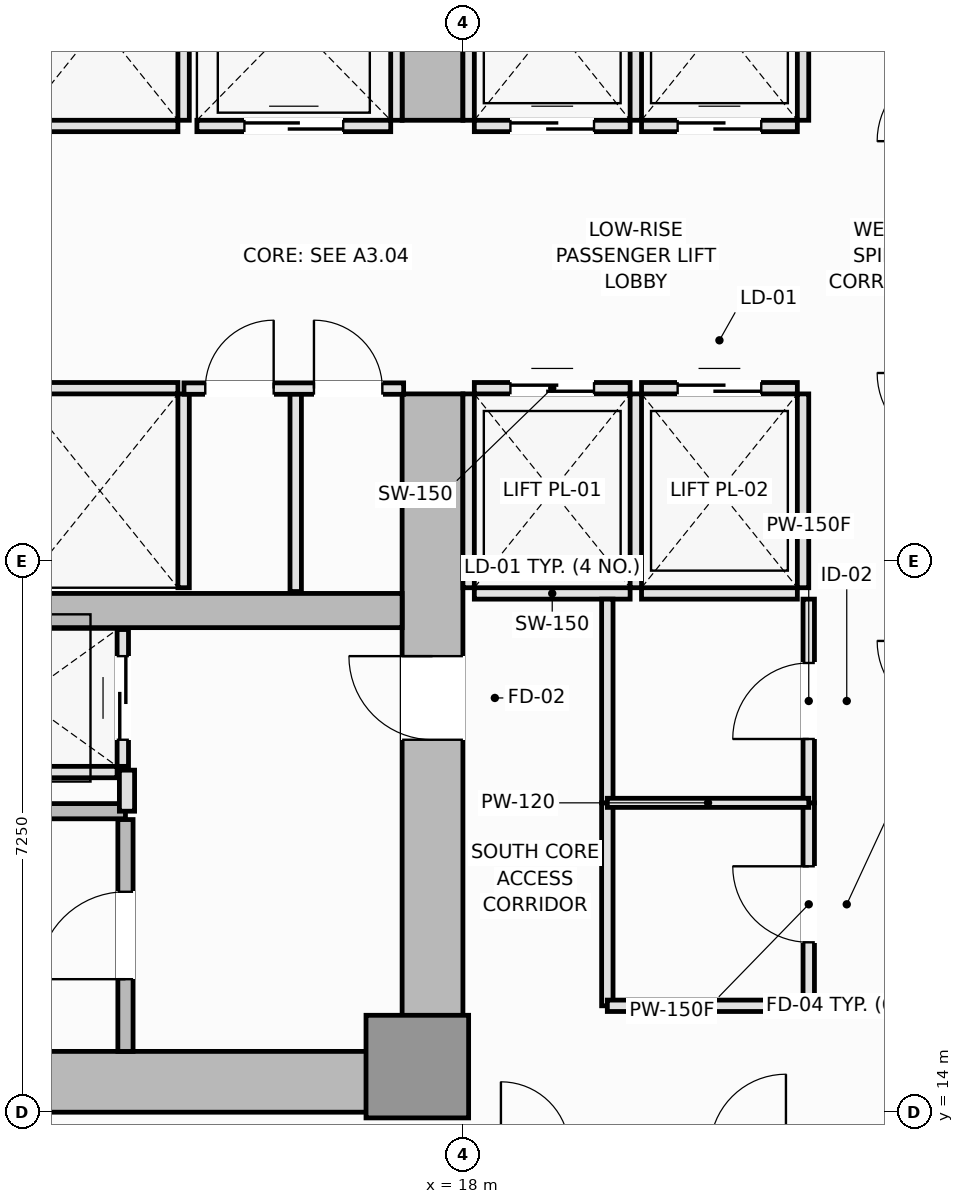
"""IFC4 building model, lengths in metres.
Left out: names, types, materials, properties, quantities, classifications, styles, units other than length and angle.
Written with IfcOpenShell. Run it as: python <this file> out.ifc"""

import sys

from ifc_helpers import new_model, si_unit, direction, frame, frame_2d, origin, origin_2d, place, context, subcontext, project, spatial, rectangle, extrude, element, fill, save


model = new_model("IFC4")
c1 = context("Model", 3, precision=1e-05, world=origin(), true_north=direction((0.0, 1.0)))
c2 = subcontext(c1, "Body", "Model", "MODEL_VIEW")
j1 = project(units=[si_unit("LENGTHUNIT", "METRE"), si_unit("PLANEANGLEUNIT", "RADIAN")], contexts=[c1])
p1 = place(None, origin())
s1 = spatial("IfcSite", under=j1, at=p1, CompositionType="ELEMENT")
p2 = place(p1, origin())
s2 = spatial("IfcBuilding", under=s1, at=p2, CompositionType="ELEMENT")
p3 = place(p2, frame((0.0, 0.0, 89.5)))
s3 = spatial("IfcBuildingStorey", under=s2, at=p3, CompositionType="ELEMENT", Elevation=89.5)
p4 = place(p3, frame((4.5, 14.4, 0.0), z_axis=(0.0, 0.0, 1.0), x_axis=(1.0, 0.0, 0.0)))
e1 = element("IfcWall", 1, at=p4, inside=s3, PredefinedType="SHEAR", context=c2, shape_type="SweptSolid", body=[
    extrude(rectangle(XDim=13.5, YDim=0.8, at=frame_2d((6.75, 0.0))), origin(), (0.0, 0.0, 1.0), 3.55),
])
p5 = place(p3, frame((17.6, 14.8, 0.0), z_axis=(0.0, 0.0, 1.0), x_axis=(0.0, 1.0, 0.0)))
e2 = element("IfcWall", 2, at=p5, inside=s3, PredefinedType="SHEAR", context=c2, shape_type="SweptSolid", body=[
    extrude(rectangle(XDim=8.65, YDim=0.8, at=frame_2d((4.325, 0.0))), origin(), (0.0, 0.0, 1.0), 3.55),
])
p6 = place(p5, frame((4.1, 0.0, 0.0)))
e3 = element("IfcOpeningElement", 3, at=p6, cuts=e2, PredefinedType="OPENING", context=c2, shape_type="SweptSolid", body=[
    extrude(rectangle(XDim=1.1, YDim=2.15, at=frame_2d((0.55, 1.075))), frame((0.0, 0.41, 0.0), z_axis=(0.0, -1.0, 0.0), x_axis=(1.0, 0.0, 0.0)), (0.0, 0.0, 1.0), 0.82),
])
p7 = place(p3, frame((17.6, 27.05, 0.0), z_axis=(0.0, 0.0, 1.0), x_axis=(0.0, 1.0, 0.0)))
e4 = element("IfcWall", 4, at=p7, inside=s3, PredefinedType="SHEAR", context=c2, shape_type="SweptSolid", body=[
    extrude(rectangle(XDim=8.65, YDim=0.8, at=frame_2d((4.325, 0.0))), origin(), (0.0, 0.0, 1.0), 3.55),
])
p8 = place(p7, frame((3.45, 0.0, 0.0)))
e5 = element("IfcOpeningElement", 5, at=p8, cuts=e4, PredefinedType="OPENING", context=c2, shape_type="SweptSolid", body=[
    extrude(rectangle(XDim=1.1, YDim=2.15, at=frame_2d((0.55, 1.075))), frame((0.0, 0.41, 0.0), z_axis=(0.0, -1.0, 0.0), x_axis=(1.0, 0.0, 0.0)), (0.0, 0.0, 1.0), 0.82),
])
p9 = place(p3, frame((5.3, 20.6, 0.0), z_axis=(0.0, 0.0, 1.0), x_axis=(1.0, 0.0, 0.0)))
e6 = element("IfcWall", 6, at=p9, inside=s3, PredefinedType="SHEAR", context=c2, shape_type="SweptSolid", body=[
    extrude(rectangle(XDim=11.9, YDim=0.45, at=frame_2d((5.95, 0.0))), origin(), (0.0, 0.0, 1.0), 3.55),
])
p10 = place(p3, frame((17.4, 14.6, 0.0), z_axis=(0.0, 0.0, 1.0), x_axis=(1.0, 0.0, 0.0)))
e7 = element("IfcColumn", 7, at=p10, inside=s3, PredefinedType="PILASTER", context=c2, shape_type="SweptSolid", body=[
    extrude(rectangle(XDim=1.35, YDim=1.35, at=origin_2d()), origin(), (0.0, 0.0, 1.0), 3.55),
])
p11 = place(p3, frame((5.9, 17.96, 0.0), z_axis=(0.0, 0.0, 1.0), x_axis=(1.0, 0.0, 0.0)))
e8 = element("IfcWall", 8, at=p11, inside=s3, PredefinedType="SOLIDWALL", context=c2, shape_type="SweptSolid", body=[
    extrude(rectangle(XDim=7.66, YDim=0.2, at=frame_2d((3.83, 0.0))), origin(), (0.0, 0.0, 1.0), 3.55),
])
p12 = place(p3, frame((13.56, 14.8, 0.0), z_axis=(0.0, 0.0, 1.0), x_axis=(0.0, 1.0, 0.0)))
e9 = element("IfcWall", 9, at=p12, inside=s3, PredefinedType="SOLIDWALL", context=c2, shape_type="SweptSolid", body=[
    extrude(rectangle(XDim=3.05, YDim=0.2, at=frame_2d((1.525, 0.0))), origin(), (0.0, 0.0, 1.0), 3.55),
])
p13 = place(p12, frame((0.95, 0.0, 0.0)))
e10 = element("IfcOpeningElement", 10, at=p13, cuts=e9, PredefinedType="OPENING", context=c2, shape_type="SweptSolid", body=[
    extrude(rectangle(XDim=1.15, YDim=2.15, at=frame_2d((0.575, 1.075))), frame((0.0, 0.11, 0.0), z_axis=(0.0, -1.0, 0.0), x_axis=(1.0, 0.0, 0.0)), (0.0, 0.0, 1.0), 0.22),
])
p14 = place(p3, frame((18.15, 20.825, 0.0), z_axis=(0.0, 0.0, 1.0), x_axis=(1.0, 0.0, 0.0)))
e11 = element("IfcWall", 11, at=p14, inside=s3, PredefinedType="PARTITIONING", context=c2, shape_type="SweptSolid", body=[
    extrude(rectangle(XDim=2.05, YDim=0.15, at=frame_2d((1.025, 0.0))), origin(), (0.0, 0.0, 1.0), 3.35),
])
p15 = place(p3, frame((18.15, 23.525, 0.0), z_axis=(0.0, 0.0, 1.0), x_axis=(1.0, 0.0, 0.0)))
e12 = element("IfcWall", 12, at=p15, inside=s3, PredefinedType="PARTITIONING", context=c2, shape_type="SweptSolid", body=[
    extrude(rectangle(XDim=2.05, YDim=0.15, at=frame_2d((1.025, 0.0))), origin(), (0.0, 0.0, 1.0), 3.35),
])
p16 = place(p15, frame((0.475, 0.0, 0.0)))
e13 = element("IfcOpeningElement", 13, at=p16, cuts=e12, PredefinedType="OPENING", context=c2, shape_type="SweptSolid", body=[
    extrude(rectangle(XDim=1.1, YDim=2.2, at=frame_2d((0.55, 1.1))), frame((0.0, 0.085, 0.0), z_axis=(0.0, -1.0, 0.0), x_axis=(1.0, 0.0, 0.0)), (0.0, 0.0, 1.0), 0.17),
])
for number, where, z_axis, x_axis in (
    (14, (18.075, 20.9, 0.0), (0.0, 0.0, 1.0), (0.0, 1.0, 0.0)),
    (15, (20.275, 20.9, 0.0), (0.0, 0.0, 1.0), (0.0, 1.0, 0.0)),
):
    element("IfcWall", number, at=place(p3, frame(where, z_axis=z_axis, x_axis=x_axis)), inside=s3, PredefinedType="PARTITIONING", context=c2, shape_type="SweptSolid", body=[
        extrude(rectangle(XDim=2.55, YDim=0.15, at=frame_2d((1.275, 0.0))), origin(), (0.0, 0.0, 1.0), 3.35),
    ])
p17 = place(p3, frame((20.35, 20.825, 0.0), z_axis=(0.0, 0.0, 1.0), x_axis=(1.0, 0.0, 0.0)))
e16 = element("IfcWall", 16, at=p17, inside=s3, PredefinedType="PARTITIONING", context=c2, shape_type="SweptSolid", body=[
    extrude(rectangle(XDim=2.05, YDim=0.15, at=frame_2d((1.025, 0.0))), origin(), (0.0, 0.0, 1.0), 3.35),
])
p18 = place(p3, frame((20.35, 23.525, 0.0), z_axis=(0.0, 0.0, 1.0), x_axis=(1.0, 0.0, 0.0)))
e17 = element("IfcWall", 17, at=p18, inside=s3, PredefinedType="PARTITIONING", context=c2, shape_type="SweptSolid", body=[
    extrude(rectangle(XDim=2.05, YDim=0.15, at=frame_2d((1.025, 0.0))), origin(), (0.0, 0.0, 1.0), 3.35),
])
p19 = place(p18, frame((0.475, 0.0, 0.0)))
e18 = element("IfcOpeningElement", 18, at=p19, cuts=e17, PredefinedType="OPENING", context=c2, shape_type="SweptSolid", body=[
    extrude(rectangle(XDim=1.1, YDim=2.2, at=frame_2d((0.55, 1.1))), frame((0.0, 0.085, 0.0), z_axis=(0.0, -1.0, 0.0), x_axis=(1.0, 0.0, 0.0)), (0.0, 0.0, 1.0), 0.17),
])
p20 = place(p3, frame((22.475, 20.9, 0.0), z_axis=(0.0, 0.0, 1.0), x_axis=(0.0, 1.0, 0.0)))
e19 = element("IfcWall", 19, at=p20, inside=s3, PredefinedType="PARTITIONING", context=c2, shape_type="SweptSolid", body=[
    extrude(rectangle(XDim=2.55, YDim=0.15, at=frame_2d((1.275, 0.0))), origin(), (0.0, 0.0, 1.0), 3.35),
])
p21 = place(p3, frame((18.15, 26.975, 0.0), z_axis=(0.0, 0.0, 1.0), x_axis=(1.0, 0.0, 0.0)))
e20 = element("IfcWall", 20, at=p21, inside=s3, PredefinedType="PARTITIONING", context=c2, shape_type="SweptSolid", body=[
    extrude(rectangle(XDim=2.05, YDim=0.15, at=frame_2d((1.025, 0.0))), origin(), (0.0, 0.0, 1.0), 3.35),
])
p22 = place(p21, frame((0.475, 0.0, 0.0)))
e21 = element("IfcOpeningElement", 21, at=p22, cuts=e20, PredefinedType="OPENING", context=c2, shape_type="SweptSolid", body=[
    extrude(rectangle(XDim=1.1, YDim=2.2, at=frame_2d((0.55, 1.1))), frame((0.0, 0.085, 0.0), z_axis=(0.0, -1.0, 0.0), x_axis=(1.0, 0.0, 0.0)), (0.0, 0.0, 1.0), 0.17),
])
for number, where, z_axis, x_axis in (
    (22, (18.075, 27.05, 0.0), (0.0, 0.0, 1.0), (0.0, 1.0, 0.0)),
    (23, (20.275, 27.05, 0.0), (0.0, 0.0, 1.0), (0.0, 1.0, 0.0)),
):
    element("IfcWall", number, at=place(p3, frame(where, z_axis=z_axis, x_axis=x_axis)), inside=s3, PredefinedType="PARTITIONING", context=c2, shape_type="SweptSolid", body=[
        extrude(rectangle(XDim=2.55, YDim=0.15, at=frame_2d((1.275, 0.0))), origin(), (0.0, 0.0, 1.0), 3.35),
    ])
p23 = place(p3, frame((20.35, 26.975, 0.0), z_axis=(0.0, 0.0, 1.0), x_axis=(1.0, 0.0, 0.0)))
e24 = element("IfcWall", 24, at=p23, inside=s3, PredefinedType="PARTITIONING", context=c2, shape_type="SweptSolid", body=[
    extrude(rectangle(XDim=2.05, YDim=0.15, at=frame_2d((1.025, 0.0))), origin(), (0.0, 0.0, 1.0), 3.35),
])
p24 = place(p23, frame((0.475, 0.0, 0.0)))
e25 = element("IfcOpeningElement", 25, at=p24, cuts=e24, PredefinedType="OPENING", context=c2, shape_type="SweptSolid", body=[
    extrude(rectangle(XDim=1.1, YDim=2.2, at=frame_2d((0.55, 1.1))), frame((0.0, 0.085, 0.0), z_axis=(0.0, -1.0, 0.0), x_axis=(1.0, 0.0, 0.0)), (0.0, 0.0, 1.0), 0.17),
])
p25 = place(p3, frame((22.475, 27.05, 0.0), z_axis=(0.0, 0.0, 1.0), x_axis=(0.0, 1.0, 0.0)))
e26 = element("IfcWall", 26, at=p25, inside=s3, PredefinedType="PARTITIONING", context=c2, shape_type="SweptSolid", body=[
    extrude(rectangle(XDim=2.55, YDim=0.15, at=frame_2d((1.275, 0.0))), origin(), (0.0, 0.0, 1.0), 3.35),
])
p26 = place(p3, frame((12.2, 23.525, 0.0), z_axis=(0.0, 0.0, 1.0), x_axis=(1.0, 0.0, 0.0)))
e27 = element("IfcWall", 27, at=p26, inside=s3, PredefinedType="PARTITIONING", context=c2, shape_type="SweptSolid", body=[
    extrude(rectangle(XDim=2.05, YDim=0.15, at=frame_2d((1.025, 0.0))), origin(), (0.0, 0.0, 1.0), 3.35),
])
p27 = place(p3, frame((14.325, 20.9, 0.0), z_axis=(0.0, 0.0, 1.0), x_axis=(0.0, 1.0, 0.0)))
e28 = element("IfcWall", 28, at=p27, inside=s3, PredefinedType="PARTITIONING", context=c2, shape_type="SweptSolid", body=[
    extrude(rectangle(XDim=2.55, YDim=0.15, at=frame_2d((1.275, 0.0))), origin(), (0.0, 0.0, 1.0), 3.35),
])
p28 = place(p3, frame((12.2, 26.975, 0.0), z_axis=(0.0, 0.0, 1.0), x_axis=(1.0, 0.0, 0.0)))
e29 = element("IfcWall", 29, at=p28, inside=s3, PredefinedType="PARTITIONING", context=c2, shape_type="SweptSolid", body=[
    extrude(rectangle(XDim=2.05, YDim=0.15, at=frame_2d((1.025, 0.0))), origin(), (0.0, 0.0, 1.0), 3.35),
])
p29 = place(p3, frame((14.325, 27.05, 0.0), z_axis=(0.0, 0.0, 1.0), x_axis=(0.0, 1.0, 0.0)))
e30 = element("IfcWall", 30, at=p29, inside=s3, PredefinedType="PARTITIONING", context=c2, shape_type="SweptSolid", body=[
    extrude(rectangle(XDim=2.55, YDim=0.15, at=frame_2d((1.275, 0.0))), origin(), (0.0, 0.0, 1.0), 3.35),
])
p30 = place(p3, frame((14.5, 26.975, 0.0), z_axis=(0.0, 0.0, 1.0), x_axis=(1.0, 0.0, 0.0)))
e31 = element("IfcWall", 31, at=p30, inside=s3, PredefinedType="PARTITIONING", context=c2, shape_type="SweptSolid", body=[
    extrude(rectangle(XDim=2.55, YDim=0.15, at=frame_2d((1.275, 0.0))), origin(), (0.0, 0.0, 1.0), 3.35),
])
p31 = place(p30, frame((0.625, 0.0, 0.0)))
e32 = element("IfcOpeningElement", 32, at=p31, cuts=e31, PredefinedType="OPENING", context=c2, shape_type="SweptSolid", body=[
    extrude(rectangle(XDim=1.3, YDim=2.2, at=frame_2d((0.65, 1.1))), frame((0.0, 0.085, 0.0), z_axis=(0.0, -1.0, 0.0), x_axis=(1.0, 0.0, 0.0)), (0.0, 0.0, 1.0), 0.17),
])
p32 = place(p3, frame((17.125, 27.05, 0.0), z_axis=(0.0, 0.0, 1.0), x_axis=(0.0, 1.0, 0.0)))
e33 = element("IfcWall", 33, at=p32, inside=s3, PredefinedType="PARTITIONING", context=c2, shape_type="SweptSolid", body=[
    extrude(rectangle(XDim=2.6, YDim=0.15, at=frame_2d((1.3, 0.0))), origin(), (0.0, 0.0, 1.0), 3.35),
])
p33 = place(p3, frame((10.95, 18.475, 0.0), z_axis=(0.0, 0.0, 1.0), x_axis=(1.0, 0.0, 0.0)))
e34 = element("IfcWall", 34, at=p33, inside=s3, PredefinedType="PARTITIONING", context=c2, shape_type="SweptSolid", body=[
    extrude(rectangle(XDim=2.5, YDim=0.15, at=frame_2d((1.25, 0.0))), origin(), (0.0, 0.0, 1.0), 3.35),
])
p34 = place(p3, frame((13.525, 18.55, 0.0), z_axis=(0.0, 0.0, 1.0), x_axis=(0.0, 1.0, 0.0)))
e35 = element("IfcWall", 35, at=p34, inside=s3, PredefinedType="PARTITIONING", context=c2, shape_type="SweptSolid", body=[
    extrude(rectangle(XDim=1.8, YDim=0.15, at=frame_2d((0.9, 0.0))), origin(), (0.0, 0.0, 1.0), 3.35),
])
p35 = place(p34, frame((0.35, 0.0, 0.0)))
e36 = element("IfcOpeningElement", 36, at=p35, cuts=e35, PredefinedType="OPENING", context=c2, shape_type="SweptSolid", body=[
    extrude(rectangle(XDim=1.1, YDim=2.2, at=frame_2d((0.55, 1.1))), frame((0.0, 0.085, 0.0), z_axis=(0.0, -1.0, 0.0), x_axis=(1.0, 0.0, 0.0)), (0.0, 0.0, 1.0), 0.17),
])
p36 = place(p3, frame((13.58, 17.96, 0.0), z_axis=(0.0, 0.0, 1.0), x_axis=(0.0, 1.0, 0.0)))
e37 = element("IfcWall", 37, at=p36, inside=s3, PredefinedType="PARTITIONING", context=c2, shape_type="SweptSolid", body=[
    extrude(rectangle(XDim=0.54, YDim=0.2, at=frame_2d((0.27, 0.0))), origin(), (0.0, 0.0, 1.0), 3.35),
])
p37 = place(p3, frame((15.8, 20.85, 0.0), z_axis=(0.0, 0.0, 1.0), x_axis=(0.0, 1.0, 0.0)))
e38 = element("IfcWall", 38, at=p37, inside=s3, PredefinedType="PARTITIONING", context=c2, shape_type="SweptSolid", body=[
    extrude(rectangle(XDim=2.67, YDim=0.15, at=frame_2d((1.335, 0.0))), origin(), (0.0, 0.0, 1.0), 3.35),
])
p38 = place(p3, frame((14.33, 23.52, 0.0), z_axis=(0.0, 0.0, 1.0), x_axis=(1.0, 0.0, 0.0)))
e39 = element("IfcWall", 39, at=p38, inside=s3, PredefinedType="PARTITIONING", context=c2, shape_type="SweptSolid", body=[
    extrude(rectangle(XDim=2.89, YDim=0.15, at=frame_2d((1.445, 0.0))), origin(), (0.0, 0.0, 1.0), 3.35),
])
p39 = place(p38, frame((0.28, 0.0, 0.0)))
e40 = element("IfcOpeningElement", 40, at=p39, cuts=e39, PredefinedType="OPENING", context=c2, shape_type="SweptSolid", body=[
    extrude(rectangle(XDim=0.9, YDim=2.1, at=frame_2d((0.45, 1.05))), frame((0.0, 0.085, 0.0), z_axis=(0.0, -1.0, 0.0), x_axis=(1.0, 0.0, 0.0)), (0.0, 0.0, 1.0), 0.17),
])
p40 = place(p38, frame((1.71, 0.0, 0.0)))
e41 = element("IfcOpeningElement", 41, at=p40, cuts=e39, PredefinedType="OPENING", context=c2, shape_type="SweptSolid", body=[
    extrude(rectangle(XDim=0.9, YDim=2.1, at=frame_2d((0.45, 1.05))), frame((0.0, 0.085, 0.0), z_axis=(0.0, -1.0, 0.0), x_axis=(1.0, 0.0, 0.0)), (0.0, 0.0, 1.0), 0.17),
])
p41 = place(p3, frame((22.55, 15.4, 0.0), z_axis=(0.0, 0.0, 1.0), x_axis=(0.0, 1.0, 0.0)))
e42 = element("IfcWall", 42, at=p41, inside=s3, PredefinedType="PARTITIONING", context=c2, shape_type="SweptSolid", body=[
    extrude(rectangle(XDim=2.67, YDim=0.15, at=frame_2d((1.335, 0.0))), origin(), (0.0, 0.0, 1.0), 2.99),
])
p42 = place(p41, frame((0.835, 0.0, 0.0)))
e43 = element("IfcOpeningElement", 43, at=p42, cuts=e42, PredefinedType="OPENING", context=c2, shape_type="SweptSolid", body=[
    extrude(rectangle(XDim=1.0, YDim=2.15, at=frame_2d((0.5, 1.075))), frame((0.0, 0.085, 0.0), z_axis=(0.0, -1.0, 0.0), x_axis=(1.0, 0.0, 0.0)), (0.0, 0.0, 1.0), 0.17),
])
p43 = place(p3, frame((22.55, 18.07, 0.0), z_axis=(0.0, 0.0, 1.0), x_axis=(0.0, 1.0, 0.0)))
e44 = element("IfcWall", 44, at=p43, inside=s3, PredefinedType="PARTITIONING", context=c2, shape_type="SweptSolid", body=[
    extrude(rectangle(XDim=2.68, YDim=0.15, at=frame_2d((1.34, 0.0))), origin(), (0.0, 0.0, 1.0), 2.99),
])
p44 = place(p43, frame((0.84, 0.0, 0.0)))
e45 = element("IfcOpeningElement", 45, at=p44, cuts=e44, PredefinedType="OPENING", context=c2, shape_type="SweptSolid", body=[
    extrude(rectangle(XDim=1.0, YDim=2.15, at=frame_2d((0.5, 1.075))), frame((0.0, 0.085, 0.0), z_axis=(0.0, -1.0, 0.0), x_axis=(1.0, 0.0, 0.0)), (0.0, 0.0, 1.0), 0.17),
])
p45 = place(p3, frame((19.9, 15.4, 0.0), z_axis=(0.0, 0.0, 1.0), x_axis=(0.0, 1.0, 0.0)))
e46 = element("IfcWall", 46, at=p45, inside=s3, PredefinedType="PARTITIONING", context=c2, shape_type="SweptSolid", body=[
    extrude(rectangle(XDim=2.67, YDim=0.15, at=frame_2d((1.335, 0.0))), origin(), (0.0, 0.0, 1.0), 3.35),
])
p46 = place(p3, frame((19.9, 18.07, 0.0), z_axis=(0.0, 0.0, 1.0), x_axis=(0.0, 1.0, 0.0)))
e47 = element("IfcWall", 47, at=p46, inside=s3, PredefinedType="PARTITIONING", context=c2, shape_type="SweptSolid", body=[
    extrude(rectangle(XDim=2.68, YDim=0.15, at=frame_2d((1.34, 0.0))), origin(), (0.0, 0.0, 1.0), 3.35),
])
p47 = place(p3, frame((19.9, 15.4, 0.0), z_axis=(0.0, 0.0, 1.0), x_axis=(1.0, 0.0, 0.0)))
e48 = element("IfcWall", 48, at=p47, inside=s3, PredefinedType="PARTITIONING", context=c2, shape_type="SweptSolid", body=[
    extrude(rectangle(XDim=2.65, YDim=0.15, at=frame_2d((1.325, 0.0))), origin(), (0.0, 0.0, 1.0), 3.35),
])
p48 = place(p3, frame((19.9, 18.07, 0.0), z_axis=(0.0, 0.0, 1.0), x_axis=(1.0, 0.0, 0.0)))
e49 = element("IfcWall", 49, at=p48, inside=s3, PredefinedType="PARTITIONING", context=c2, shape_type="SweptSolid", body=[
    extrude(rectangle(XDim=2.65, YDim=0.12, at=frame_2d((1.325, 0.0))), origin(), (0.0, 0.0, 1.0), 3.35),
])
p49 = place(p13, origin())
e50 = element("IfcDoor", 50, at=p49, inside=s3, OperationType="SINGLE_SWING_LEFT", PredefinedType="DOOR", context=c2, shape_type="SweptSolid", body=[
    extrude(rectangle(XDim=1.15, YDim=2.15, at=frame_2d((0.575, 1.075))), frame((0.0, 0.025, 0.0), z_axis=(0.0, -1.0, 0.0), x_axis=(1.0, 0.0, 0.0)), (0.0, 0.0, 1.0), 0.05),
])
fill(e10, e50)
p50 = place(p16, origin())
e51 = element("IfcDoor", 51, at=p50, inside=s3, OperationType="DOUBLE_DOOR_SLIDING", PredefinedType="DOOR", context=c2, shape_type="SweptSolid", body=[
    extrude(rectangle(XDim=1.1, YDim=2.2, at=frame_2d((0.55, 1.1))), frame((0.0, 0.025, 0.0), z_axis=(0.0, -1.0, 0.0), x_axis=(1.0, 0.0, 0.0)), (0.0, 0.0, 1.0), 0.05),
])
fill(e13, e51)
p51 = place(p19, origin())
e52 = element("IfcDoor", 52, at=p51, inside=s3, OperationType="DOUBLE_DOOR_SLIDING", PredefinedType="DOOR", context=c2, shape_type="SweptSolid", body=[
    extrude(rectangle(XDim=1.1, YDim=2.2, at=frame_2d((0.55, 1.1))), frame((0.0, 0.025, 0.0), z_axis=(0.0, -1.0, 0.0), x_axis=(1.0, 0.0, 0.0)), (0.0, 0.0, 1.0), 0.05),
])
fill(e18, e52)
p52 = place(p22, origin())
e53 = element("IfcDoor", 53, at=p52, inside=s3, OperationType="DOUBLE_DOOR_SLIDING", PredefinedType="DOOR", context=c2, shape_type="SweptSolid", body=[
    extrude(rectangle(XDim=1.1, YDim=2.2, at=frame_2d((0.55, 1.1))), frame((0.0, 0.025, 0.0), z_axis=(0.0, -1.0, 0.0), x_axis=(1.0, 0.0, 0.0)), (0.0, 0.0, 1.0), 0.05),
])
fill(e21, e53)
p53 = place(p24, origin())
e54 = element("IfcDoor", 54, at=p53, inside=s3, OperationType="DOUBLE_DOOR_SLIDING", PredefinedType="DOOR", context=c2, shape_type="SweptSolid", body=[
    extrude(rectangle(XDim=1.1, YDim=2.2, at=frame_2d((0.55, 1.1))), frame((0.0, 0.025, 0.0), z_axis=(0.0, -1.0, 0.0), x_axis=(1.0, 0.0, 0.0)), (0.0, 0.0, 1.0), 0.05),
])
fill(e25, e54)
p54 = place(p31, origin())
e55 = element("IfcDoor", 55, at=p54, inside=s3, OperationType="DOUBLE_DOOR_SLIDING", PredefinedType="DOOR", context=c2, shape_type="SweptSolid", body=[
    extrude(rectangle(XDim=1.3, YDim=2.2, at=frame_2d((0.65, 1.1))), frame((0.0, 0.025, 0.0), z_axis=(0.0, -1.0, 0.0), x_axis=(1.0, 0.0, 0.0)), (0.0, 0.0, 1.0), 0.05),
])
fill(e32, e55)
p55 = place(p35, origin())
e56 = element("IfcDoor", 56, at=p55, inside=s3, OperationType="DOUBLE_DOOR_SLIDING", PredefinedType="DOOR", context=c2, shape_type="SweptSolid", body=[
    extrude(rectangle(XDim=1.1, YDim=2.2, at=frame_2d((0.55, 1.1))), frame((0.0, 0.025, 0.0), z_axis=(0.0, -1.0, 0.0), x_axis=(1.0, 0.0, 0.0)), (0.0, 0.0, 1.0), 0.05),
])
fill(e36, e56)
p56 = place(p6, origin())
e57 = element("IfcDoor", 57, at=p56, inside=s3, OperationType="SINGLE_SWING_RIGHT", PredefinedType="DOOR", context=c2, shape_type="SweptSolid", body=[
    extrude(rectangle(XDim=1.1, YDim=2.15, at=frame_2d((0.55, 1.075))), frame((0.0, 0.025, 0.0), z_axis=(0.0, -1.0, 0.0), x_axis=(1.0, 0.0, 0.0)), (0.0, 0.0, 1.0), 0.05),
])
fill(e3, e57)
p57 = place(p39, origin())
e58 = element("IfcDoor", 58, at=p57, inside=s3, OperationType="SINGLE_SWING_RIGHT", PredefinedType="DOOR", context=c2, shape_type="SweptSolid", body=[
    extrude(rectangle(XDim=0.9, YDim=2.1, at=frame_2d((0.45, 1.05))), frame((0.0, 0.025, 0.0), z_axis=(0.0, -1.0, 0.0), x_axis=(1.0, 0.0, 0.0)), (0.0, 0.0, 1.0), 0.05),
])
fill(e40, e58)
p58 = place(p40, origin())
e59 = element("IfcDoor", 59, at=p58, inside=s3, OperationType="SINGLE_SWING_LEFT", PredefinedType="DOOR", context=c2, shape_type="SweptSolid", body=[
    extrude(rectangle(XDim=0.9, YDim=2.1, at=frame_2d((0.45, 1.05))), frame((0.0, 0.025, 0.0), z_axis=(0.0, -1.0, 0.0), x_axis=(1.0, 0.0, 0.0)), (0.0, 0.0, 1.0), 0.05),
])
fill(e41, e59)
p59 = place(p42, origin())
e60 = element("IfcDoor", 60, at=p59, inside=s3, OperationType="SINGLE_SWING_RIGHT", PredefinedType="DOOR", context=c2, shape_type="SweptSolid", body=[
    extrude(rectangle(XDim=1.0, YDim=2.15, at=frame_2d((0.5, 1.075))), frame((0.0, 0.025, 0.0), z_axis=(0.0, -1.0, 0.0), x_axis=(1.0, 0.0, 0.0)), (0.0, 0.0, 1.0), 0.05),
])
fill(e43, e60)
p60 = place(p44, origin())
e61 = element("IfcDoor", 61, at=p60, inside=s3, OperationType="SINGLE_SWING_LEFT", PredefinedType="DOOR", context=c2, shape_type="SweptSolid", body=[
    extrude(rectangle(XDim=1.0, YDim=2.15, at=frame_2d((0.5, 1.075))), frame((0.0, 0.025, 0.0), z_axis=(0.0, -1.0, 0.0), x_axis=(1.0, 0.0, 0.0)), (0.0, 0.0, 1.0), 0.05),
])
fill(e45, e61)
save(model, sys.argv[1])
